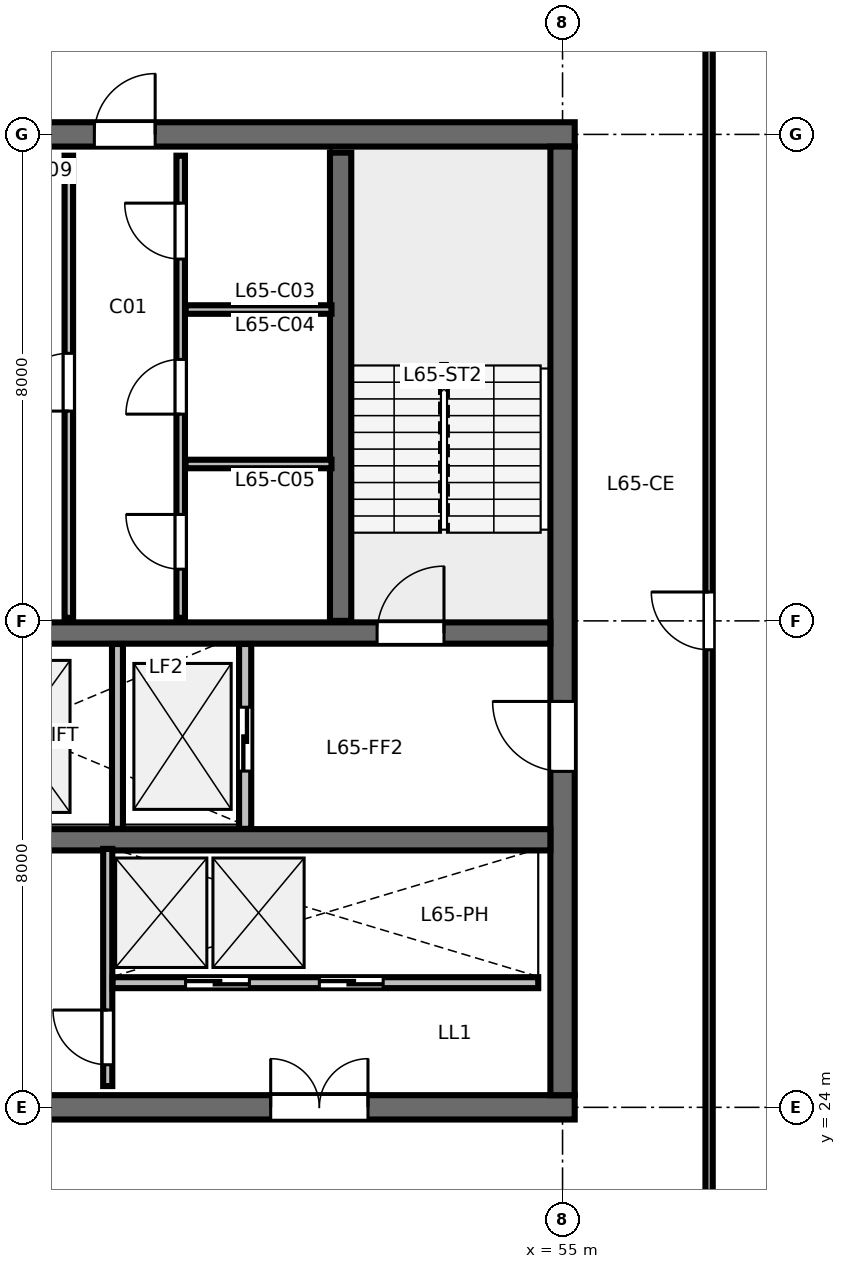
"""IFC4 building model, lengths in metres.
Left out: names, types, materials, properties, quantities, classifications, styles, units other than length and angle.
Written with IfcOpenShell. Run it as: python <this file> out.ifc"""

import sys

from ifc_helpers import new_model, si_unit, direction, frame, frame_2d, origin, place, context, subcontext, project, spatial, rectangle, extrude, element, fill, save


model = new_model("IFC4")
c1 = context("Model", 3, precision=1e-05, world=origin(), true_north=direction((0.0, 1.0)))
c2 = subcontext(c1, "Body", "Model", "MODEL_VIEW")
j1 = project(units=[si_unit("LENGTHUNIT", "METRE"), si_unit("PLANEANGLEUNIT", "RADIAN")], contexts=[c1])
p1 = place(None, origin())
s1 = spatial("IfcSite", under=j1, at=p1, CompositionType="ELEMENT")
p2 = place(p1, origin())
s2 = spatial("IfcBuilding", under=s1, at=p2, CompositionType="ELEMENT")
p3 = place(p2, frame((0.0, 0.0, 246.6)))
s3 = spatial("IfcBuildingStorey", under=s2, at=p3, CompositionType="ELEMENT", Elevation=246.6)
p4 = place(p3, frame((36.8, 24.0, 0.0), z_axis=(0.0, 0.0, 1.0), x_axis=(1.0, 0.0, 0.0)))
e1 = element("IfcWall", 1, at=p4, inside=s3, PredefinedType="SHEAR", context=c2, shape_type="SweptSolid", body=[
    extrude(rectangle(XDim=18.4, YDim=0.4, at=frame_2d((9.2, 0.0))), origin(), (0.0, 0.0, 1.0), 3.36),
])
p5 = place(p4, frame((13.4, 0.0, 0.0)))
e2 = element("IfcOpeningElement", 2, at=p5, cuts=e1, PredefinedType="OPENING", context=c2, shape_type="SweptSolid", body=[
    extrude(rectangle(XDim=1.6, YDim=2.15, at=frame_2d((0.8, 1.075))), frame((0.0, 0.21, 0.0), z_axis=(0.0, -1.0, 0.0), x_axis=(1.0, 0.0, 0.0)), (0.0, 0.0, 1.0), 0.42),
])
p6 = place(p3, frame((36.8, 40.0, 0.0), z_axis=(0.0, 0.0, 1.0), x_axis=(1.0, 0.0, 0.0)))
e3 = element("IfcWall", 3, at=p6, inside=s3, PredefinedType="SHEAR", context=c2, shape_type="SweptSolid", body=[
    extrude(rectangle(XDim=18.4, YDim=0.4, at=frame_2d((9.2, 0.0))), origin(), (0.0, 0.0, 1.0), 3.36),
])
p7 = place(p6, frame((10.5, 0.0, 0.0)))
e4 = element("IfcOpeningElement", 4, at=p7, cuts=e3, PredefinedType="OPENING", context=c2, shape_type="SweptSolid", body=[
    extrude(rectangle(XDim=1.0, YDim=2.15, at=frame_2d((0.5, 1.075))), frame((0.0, 0.21, 0.0), z_axis=(0.0, -1.0, 0.0), x_axis=(1.0, 0.0, 0.0)), (0.0, 0.0, 1.0), 0.42),
])
p8 = place(p3, frame((55.0, 24.2, 0.0), z_axis=(0.0, 0.0, 1.0), x_axis=(0.0, 1.0, 0.0)))
e5 = element("IfcWall", 5, at=p8, inside=s3, PredefinedType="SHEAR", context=c2, shape_type="SweptSolid", body=[
    extrude(rectangle(XDim=15.6, YDim=0.4, at=frame_2d((7.8, 0.0))), origin(), (0.0, 0.0, 1.0), 3.36),
])
p9 = place(p8, frame((5.325, 0.0, 0.0)))
e6 = element("IfcOpeningElement", 6, at=p9, cuts=e5, PredefinedType="OPENING", context=c2, shape_type="SweptSolid", body=[
    extrude(rectangle(XDim=1.15, YDim=2.15, at=frame_2d((0.575, 1.075))), frame((0.0, 0.21, 0.0), z_axis=(0.0, -1.0, 0.0), x_axis=(1.0, 0.0, 0.0)), (0.0, 0.0, 1.0), 0.42),
])
p10 = place(p3, frame((37.2, 31.8, 0.0), z_axis=(0.0, 0.0, 1.0), x_axis=(1.0, 0.0, 0.0)))
e7 = element("IfcWall", 7, at=p10, inside=s3, PredefinedType="SHEAR", context=c2, shape_type="SweptSolid", body=[
    extrude(rectangle(XDim=17.6, YDim=0.35, at=frame_2d((8.8, 0.0))), origin(), (0.0, 0.0, 1.0), 3.36),
])
p11 = place(p10, frame((0.85, 0.0, 0.0)))
e8 = element("IfcOpeningElement", 8, at=p11, cuts=e7, PredefinedType="OPENING", context=c2, shape_type="SweptSolid", body=[
    extrude(rectangle(XDim=1.1, YDim=2.15, at=frame_2d((0.55, 1.075))), frame((0.0, 0.185, 0.0), z_axis=(0.0, -1.0, 0.0), x_axis=(1.0, 0.0, 0.0)), (0.0, 0.0, 1.0), 0.37),
])
p12 = place(p10, frame((14.75, 0.0, 0.0)))
e9 = element("IfcOpeningElement", 9, at=p12, cuts=e7, PredefinedType="OPENING", context=c2, shape_type="SweptSolid", body=[
    extrude(rectangle(XDim=1.1, YDim=2.15, at=frame_2d((0.55, 1.075))), frame((0.0, 0.185, 0.0), z_axis=(0.0, -1.0, 0.0), x_axis=(1.0, 0.0, 0.0)), (0.0, 0.0, 1.0), 0.37),
])
p13 = place(p3, frame((37.2, 28.4, 0.0), z_axis=(0.0, 0.0, 1.0), x_axis=(1.0, 0.0, 0.0)))
e10 = element("IfcWall", 10, at=p13, inside=s3, PredefinedType="SHEAR", context=c2, shape_type="SweptSolid", body=[
    extrude(rectangle(XDim=17.6, YDim=0.35, at=frame_2d((8.8, 0.0))), origin(), (0.0, 0.0, 1.0), 3.36),
])
p14 = place(p3, frame((51.35, 32.0, 0.0), z_axis=(0.0, 0.0, 1.0), x_axis=(0.0, 1.0, 0.0)))
e11 = element("IfcWall", 11, at=p14, inside=s3, PredefinedType="SHEAR", context=c2, shape_type="SweptSolid", body=[
    extrude(rectangle(XDim=7.7, YDim=0.35, at=frame_2d((3.85, 0.0))), origin(), (0.0, 0.0, 1.0), 3.6),
])
p15 = place(p3, frame((46.88, 32.05, 0.0), z_axis=(0.0, 0.0, 1.0), x_axis=(0.0, 1.0, 0.0)))
e12 = element("IfcWall", 12, at=p15, inside=s3, PredefinedType="PARTITIONING", context=c2, shape_type="SweptSolid", body=[
    extrude(rectangle(XDim=7.6, YDim=0.14, at=frame_2d((3.8, 0.0))), origin(), (0.0, 0.0, 1.0), 3.375),
])
p16 = place(p15, frame((3.4, 0.0, 0.0)))
e13 = element("IfcOpeningElement", 13, at=p16, cuts=e12, PredefinedType="OPENING", context=c2, shape_type="SweptSolid", body=[
    extrude(rectangle(XDim=0.95, YDim=2.15, at=frame_2d((0.475, 1.075))), frame((0.0, 0.08, 0.0), z_axis=(0.0, -1.0, 0.0), x_axis=(1.0, 0.0, 0.0)), (0.0, 0.0, 1.0), 0.16),
])
p17 = place(p3, frame((48.72, 32.05, 0.0), z_axis=(0.0, 0.0, 1.0), x_axis=(0.0, 1.0, 0.0)))
e14 = element("IfcWall", 14, at=p17, inside=s3, PredefinedType="PARTITIONING", context=c2, shape_type="SweptSolid", body=[
    extrude(rectangle(XDim=7.6, YDim=0.14, at=frame_2d((3.8, 0.0))), origin(), (0.0, 0.0, 1.0), 3.375),
])
p18 = place(p17, frame((0.8, 0.0, 0.0)))
e15 = element("IfcOpeningElement", 15, at=p18, cuts=e14, PredefinedType="OPENING", context=c2, shape_type="SweptSolid", body=[
    extrude(rectangle(XDim=0.9, YDim=2.15, at=frame_2d((0.45, 1.075))), frame((0.0, 0.08, 0.0), z_axis=(0.0, -1.0, 0.0), x_axis=(1.0, 0.0, 0.0)), (0.0, 0.0, 1.0), 0.16),
])
p19 = place(p17, frame((3.35, 0.0, 0.0)))
e16 = element("IfcOpeningElement", 16, at=p19, cuts=e14, PredefinedType="OPENING", context=c2, shape_type="SweptSolid", body=[
    extrude(rectangle(XDim=0.9, YDim=2.15, at=frame_2d((0.45, 1.075))), frame((0.0, 0.08, 0.0), z_axis=(0.0, -1.0, 0.0), x_axis=(1.0, 0.0, 0.0)), (0.0, 0.0, 1.0), 0.16),
])
p20 = place(p17, frame((5.9, 0.0, 0.0)))
e17 = element("IfcOpeningElement", 17, at=p20, cuts=e14, PredefinedType="OPENING", context=c2, shape_type="SweptSolid", body=[
    extrude(rectangle(XDim=0.92, YDim=2.15, at=frame_2d((0.46, 1.075))), frame((0.0, 0.08, 0.0), z_axis=(0.0, -1.0, 0.0), x_axis=(1.0, 0.0, 0.0)), (0.0, 0.0, 1.0), 0.16),
])
for number, where, z_axis, x_axis in (
    (18, (48.8, 34.58, 0.0), (0.0, 0.0, 1.0), (1.0, 0.0, 0.0)),
    (19, (48.8, 37.12, 0.0), (0.0, 0.0, 1.0), (1.0, 0.0, 0.0)),
):
    element("IfcWall", number, at=place(p3, frame(where, z_axis=z_axis, x_axis=x_axis)), inside=s3, PredefinedType="PARTITIONING", context=c2, shape_type="SweptSolid", body=[
        extrude(rectangle(XDim=2.4, YDim=0.14, at=frame_2d((1.2, 0.0))), origin(), (0.0, 0.0, 1.0), 3.375),
    ])
p21 = place(p3, frame((49.78, 28.58, 0.0), z_axis=(0.0, 0.0, 1.0), x_axis=(0.0, 1.0, 0.0)))
e20 = element("IfcWall", 20, at=p21, inside=s3, PredefinedType="PARTITIONING", context=c2, shape_type="SweptSolid", body=[
    extrude(rectangle(XDim=3.04, YDim=0.2, at=frame_2d((1.52, 0.0))), origin(), (0.0, 0.0, 1.0), 3.375),
])
p22 = place(p21, frame((0.95, 0.0, 0.0)))
e21 = element("IfcOpeningElement", 21, at=p22, cuts=e20, PredefinedType="OPENING", context=c2, shape_type="SweptSolid", body=[
    extrude(rectangle(XDim=1.05, YDim=2.15, at=frame_2d((0.525, 1.075))), frame((0.0, 0.11, 0.0), z_axis=(0.0, -1.0, 0.0), x_axis=(1.0, 0.0, 0.0)), (0.0, 0.0, 1.0), 0.22),
])
p23 = place(p3, frame((47.68, 28.58, 0.0), z_axis=(0.0, 0.0, 1.0), x_axis=(0.0, 1.0, 0.0)))
e22 = element("IfcWall", 22, at=p23, inside=s3, PredefinedType="PARTITIONING", context=c2, shape_type="SweptSolid", body=[
    extrude(rectangle(XDim=3.04, YDim=0.18, at=frame_2d((1.52, 0.0))), origin(), (0.0, 0.0, 1.0), 3.375),
])
p24 = place(p3, frame((47.52, 24.35, 0.0), z_axis=(0.0, 0.0, 1.0), x_axis=(0.0, 1.0, 0.0)))
e23 = element("IfcWall", 23, at=p24, inside=s3, PredefinedType="PARTITIONING", context=c2, shape_type="SweptSolid", body=[
    extrude(rectangle(XDim=3.9, YDim=0.15, at=frame_2d((1.95, 0.0))), origin(), (0.0, 0.0, 1.0), 3.375),
])
p25 = place(p24, frame((0.35, 0.0, 0.0)))
e24 = element("IfcOpeningElement", 24, at=p25, cuts=e23, PredefinedType="OPENING", context=c2, shape_type="SweptSolid", body=[
    extrude(rectangle(XDim=0.9, YDim=2.15, at=frame_2d((0.45, 1.075))), frame((0.0, 0.085, 0.0), z_axis=(0.0, -1.0, 0.0), x_axis=(1.0, 0.0, 0.0)), (0.0, 0.0, 1.0), 0.17),
])
p26 = place(p3, frame((47.6, 26.05, 0.0), z_axis=(0.0, 0.0, 1.0), x_axis=(1.0, 0.0, 0.0)))
e25 = element("IfcWall", 25, at=p26, inside=s3, PredefinedType="PARTITIONING", context=c2, shape_type="SweptSolid", body=[
    extrude(rectangle(XDim=7.0, YDim=0.18, at=frame_2d((3.5, 0.0))), origin(), (0.0, 0.0, 1.0), 3.375),
])
p27 = place(p26, frame((1.2, 0.0, 0.0)))
e26 = element("IfcOpeningElement", 26, at=p27, cuts=e25, PredefinedType="OPENING", context=c2, shape_type="SweptSolid", body=[
    extrude(rectangle(XDim=1.05, YDim=2.15, at=frame_2d((0.525, 1.075))), frame((0.0, 0.1, 0.0), z_axis=(0.0, -1.0, 0.0), x_axis=(1.0, 0.0, 0.0)), (0.0, 0.0, 1.0), 0.2),
])
p28 = place(p26, frame((3.4, 0.0, 0.0)))
e27 = element("IfcOpeningElement", 27, at=p28, cuts=e25, PredefinedType="OPENING", context=c2, shape_type="SweptSolid", body=[
    extrude(rectangle(XDim=1.05, YDim=2.15, at=frame_2d((0.525, 1.075))), frame((0.0, 0.1, 0.0), z_axis=(0.0, -1.0, 0.0), x_axis=(1.0, 0.0, 0.0)), (0.0, 0.0, 1.0), 0.2),
])
p29 = place(p3, frame((57.41, 21.65, 0.0), z_axis=(0.0, 0.0, 1.0), x_axis=(0.0, 1.0, 0.0)))
e28 = element("IfcWall", 28, at=p29, inside=s3, PredefinedType="PARTITIONING", context=c2, shape_type="SweptSolid", body=[
    extrude(rectangle(XDim=20.7, YDim=0.12, at=frame_2d((10.35, 0.0))), origin(), (0.0, 0.0, 1.0), 2.655),
])
p30 = place(p29, frame((9.875, 0.0, 0.0)))
e29 = element("IfcOpeningElement", 29, at=p30, cuts=e28, PredefinedType="OPENING", context=c2, shape_type="SweptSolid", body=[
    extrude(rectangle(XDim=0.95, YDim=2.15, at=frame_2d((0.475, 1.075))), frame((0.0, 0.07, 0.0), z_axis=(0.0, -1.0, 0.0), x_axis=(1.0, 0.0, 0.0)), (0.0, 0.0, 1.0), 0.14),
])
p31 = place(p12, origin())
e30 = element("IfcDoor", 30, at=p31, inside=s3, OperationType="SINGLE_SWING_RIGHT", PredefinedType="DOOR", context=c2, shape_type="SweptSolid", body=[
    extrude(rectangle(XDim=1.1, YDim=2.15, at=frame_2d((0.55, 1.075))), frame((0.0, 0.025, 0.0), z_axis=(0.0, -1.0, 0.0), x_axis=(1.0, 0.0, 0.0)), (0.0, 0.0, 1.0), 0.05),
])
fill(e9, e30)
p32 = place(p7, origin())
e31 = element("IfcDoor", 31, at=p32, inside=s3, OperationType="SINGLE_SWING_RIGHT", PredefinedType="DOOR", context=c2, shape_type="SweptSolid", body=[
    extrude(rectangle(XDim=1.0, YDim=2.15, at=frame_2d((0.5, 1.075))), frame((0.0, 0.025, 0.0), z_axis=(0.0, -1.0, 0.0), x_axis=(1.0, 0.0, 0.0)), (0.0, 0.0, 1.0), 0.05),
])
fill(e4, e31)
p33 = place(p9, origin())
e32 = element("IfcDoor", 32, at=p33, inside=s3, OperationType="SINGLE_SWING_RIGHT", PredefinedType="DOOR", context=c2, shape_type="SweptSolid", body=[
    extrude(rectangle(XDim=1.15, YDim=2.15, at=frame_2d((0.575, 1.075))), frame((0.0, 0.025, 0.0), z_axis=(0.0, -1.0, 0.0), x_axis=(1.0, 0.0, 0.0)), (0.0, 0.0, 1.0), 0.05),
])
fill(e6, e32)
p34 = place(p5, origin())
e33 = element("IfcDoor", 33, at=p34, inside=s3, OperationType="DOUBLE_DOOR_SINGLE_SWING", PredefinedType="DOOR", context=c2, shape_type="SweptSolid", body=[
    extrude(rectangle(XDim=1.6, YDim=2.15, at=frame_2d((0.8, 1.075))), frame((0.0, 0.025, 0.0), z_axis=(0.0, -1.0, 0.0), x_axis=(1.0, 0.0, 0.0)), (0.0, 0.0, 1.0), 0.05),
])
fill(e2, e33)
p35 = place(p16, origin())
e34 = element("IfcDoor", 34, at=p35, inside=s3, OperationType="SINGLE_SWING_LEFT", PredefinedType="DOOR", context=c2, shape_type="SweptSolid", body=[
    extrude(rectangle(XDim=0.95, YDim=2.15, at=frame_2d((0.475, 1.075))), frame((0.0, 0.025, 0.0), z_axis=(0.0, -1.0, 0.0), x_axis=(1.0, 0.0, 0.0)), (0.0, 0.0, 1.0), 0.05),
])
fill(e13, e34)
p36 = place(p18, origin())
e35 = element("IfcDoor", 35, at=p36, inside=s3, OperationType="SINGLE_SWING_RIGHT", PredefinedType="DOOR", context=c2, shape_type="SweptSolid", body=[
    extrude(rectangle(XDim=0.9, YDim=2.15, at=frame_2d((0.45, 1.075))), frame((0.0, 0.025, 0.0), z_axis=(0.0, -1.0, 0.0), x_axis=(1.0, 0.0, 0.0)), (0.0, 0.0, 1.0), 0.05),
])
fill(e15, e35)
p37 = place(p19, origin())
e36 = element("IfcDoor", 36, at=p37, inside=s3, OperationType="SINGLE_SWING_LEFT", PredefinedType="DOOR", context=c2, shape_type="SweptSolid", body=[
    extrude(rectangle(XDim=0.9, YDim=2.15, at=frame_2d((0.45, 1.075))), frame((0.0, 0.025, 0.0), z_axis=(0.0, -1.0, 0.0), x_axis=(1.0, 0.0, 0.0)), (0.0, 0.0, 1.0), 0.05),
])
fill(e16, e36)
p38 = place(p20, origin())
e37 = element("IfcDoor", 37, at=p38, inside=s3, OperationType="SINGLE_SWING_RIGHT", PredefinedType="DOOR", context=c2, shape_type="SweptSolid", body=[
    extrude(rectangle(XDim=0.92, YDim=2.15, at=frame_2d((0.46, 1.075))), frame((0.0, 0.025, 0.0), z_axis=(0.0, -1.0, 0.0), x_axis=(1.0, 0.0, 0.0)), (0.0, 0.0, 1.0), 0.05),
])
fill(e17, e37)
p39 = place(p22, origin())
e38 = element("IfcDoor", 38, at=p39, inside=s3, OperationType="SLIDING_TO_RIGHT", PredefinedType="DOOR", context=c2, shape_type="SweptSolid", body=[
    extrude(rectangle(XDim=1.05, YDim=2.15, at=frame_2d((0.525, 1.075))), frame((0.0, 0.025, 0.0), z_axis=(0.0, -1.0, 0.0), x_axis=(1.0, 0.0, 0.0)), (0.0, 0.0, 1.0), 0.05),
])
fill(e21, e38)
p40 = place(p25, origin())
e39 = element("IfcDoor", 39, at=p40, inside=s3, OperationType="SINGLE_SWING_RIGHT", PredefinedType="DOOR", context=c2, shape_type="SweptSolid", body=[
    extrude(rectangle(XDim=0.9, YDim=2.15, at=frame_2d((0.45, 1.075))), frame((0.0, 0.025, 0.0), z_axis=(0.0, -1.0, 0.0), x_axis=(1.0, 0.0, 0.0)), (0.0, 0.0, 1.0), 0.05),
])
fill(e24, e39)
p41 = place(p27, origin())
e40 = element("IfcDoor", 40, at=p41, inside=s3, OperationType="SLIDING_TO_LEFT", PredefinedType="DOOR", context=c2, shape_type="SweptSolid", body=[
    extrude(rectangle(XDim=1.05, YDim=2.15, at=frame_2d((0.525, 1.075))), frame((0.0, 0.025, 0.0), z_axis=(0.0, -1.0, 0.0), x_axis=(1.0, 0.0, 0.0)), (0.0, 0.0, 1.0), 0.05),
])
fill(e26, e40)
p42 = place(p28, origin())
e41 = element("IfcDoor", 41, at=p42, inside=s3, OperationType="SLIDING_TO_RIGHT", PredefinedType="DOOR", context=c2, shape_type="SweptSolid", body=[
    extrude(rectangle(XDim=1.05, YDim=2.15, at=frame_2d((0.525, 1.075))), frame((0.0, 0.025, 0.0), z_axis=(0.0, -1.0, 0.0), x_axis=(1.0, 0.0, 0.0)), (0.0, 0.0, 1.0), 0.05),
])
fill(e27, e41)
p43 = place(p30, origin())
e42 = element("IfcDoor", 42, at=p43, inside=s3, OperationType="SINGLE_SWING_RIGHT", PredefinedType="DOOR", context=c2, shape_type="SweptSolid", body=[
    extrude(rectangle(XDim=0.95, YDim=2.15, at=frame_2d((0.475, 1.075))), frame((0.0, 0.025, 0.0), z_axis=(0.0, -1.0, 0.0), x_axis=(1.0, 0.0, 0.0)), (0.0, 0.0, 1.0), 0.05),
])
fill(e29, e42)
save(model, sys.argv[1])
